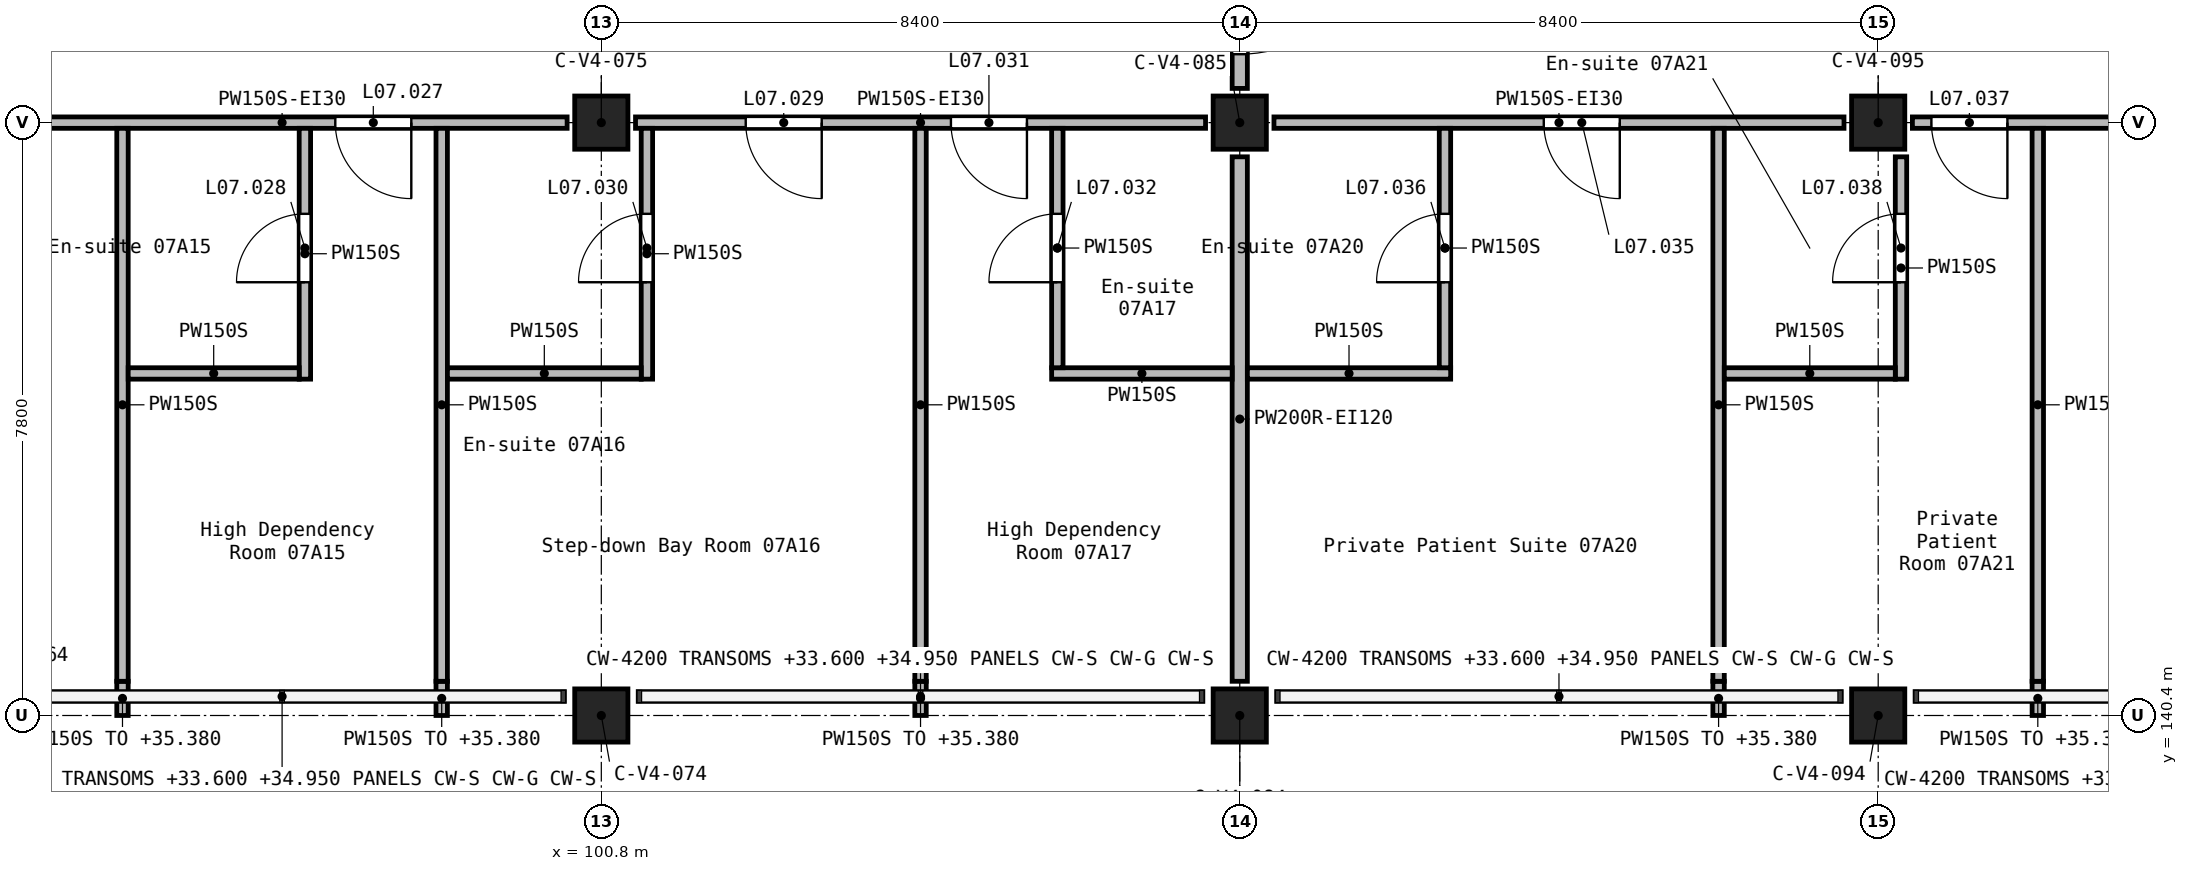
"""IFC4 building model, lengths in metres.
Left out: names, types, materials, properties, quantities, classifications, styles, units other than length and angle.
Written with IfcOpenShell. Run it as: python <this file> out.ifc"""

import sys

from ifc_helpers import new_model, si_unit, direction, frame, frame_2d, origin, origin_2d, place, context, subcontext, project, spatial, rectangle, extrude, element, fill, save


model = new_model("IFC4")
c1 = context("Model", 3, precision=1e-05, world=origin(), true_north=direction((0.0, 1.0)))
c2 = subcontext(c1, "Body", "Model", "MODEL_VIEW")
j1 = project(units=[si_unit("LENGTHUNIT", "METRE"), si_unit("PLANEANGLEUNIT", "RADIAN")], contexts=[c1])
p1 = place(None, origin())
s1 = spatial("IfcSite", under=j1, at=p1, CompositionType="ELEMENT")
p2 = place(p1, origin())
s2 = spatial("IfcBuilding", under=s1, at=p2, CompositionType="ELEMENT")
p3 = place(p2, frame((0.0, 0.0, 32.7)))
s3 = spatial("IfcBuildingStorey", under=s2, at=p3, CompositionType="ELEMENT", Elevation=32.7)
for number, where, z_axis, x_axis in (
    (1, (100.8, 140.4, 0.0), (0.0, 0.0, 1.0), (1.0, 0.0, 0.0)),
    (2, (100.8, 148.2, 0.0), (0.0, 0.0, 1.0), (1.0, 0.0, 0.0)),
    (3, (109.2, 140.4, 0.0), (0.0, 0.0, 1.0), (1.0, 0.0, 0.0)),
    (4, (109.2, 148.2, 0.0), (0.0, 0.0, 1.0), (1.0, 0.0, 0.0)),
    (5, (117.6, 140.4, 0.0), (0.0, 0.0, 1.0), (1.0, 0.0, 0.0)),
    (6, (117.6, 148.2, 0.0), (0.0, 0.0, 1.0), (1.0, 0.0, 0.0)),
):
    element("IfcColumn", number, at=place(p3, frame(where, z_axis=z_axis, x_axis=x_axis)), inside=s3, PredefinedType="COLUMN", context=c2, shape_type="SweptSolid", body=[
        extrude(rectangle(XDim=0.7, YDim=0.7, at=origin_2d()), origin(), (0.0, 0.0, 1.0), 3.9),
    ])
p4 = place(p3, frame((109.2, 151.35, 0.0), z_axis=(0.0, 0.0, 1.0), x_axis=(0.0, -1.0, 0.0)))
e7 = element("IfcWall", 7, at=p4, inside=s3, PredefinedType="SOLIDWALL", context=c2, shape_type="SweptSolid", body=[
    extrude(rectangle(XDim=2.7, YDim=0.2, at=frame_2d((1.35, 0.0))), origin(), (0.0, 0.0, 1.0), 3.6),
])
p5 = place(p4, frame((0.45, 0.0, 0.0)))
e8 = element("IfcOpeningElement", 8, at=p5, cuts=e7, PredefinedType="OPENING", context=c2, shape_type="SweptSolid", body=[
    extrude(rectangle(XDim=1.8, YDim=2.1, at=frame_2d((0.9, 1.05))), frame((0.0, 0.11, 0.0), z_axis=(0.0, -1.0, 0.0), x_axis=(1.0, 0.0, 0.0)), (0.0, 0.0, 1.0), 0.22),
])
p6 = place(p3, frame((109.2, 147.75, 0.0), z_axis=(0.0, 0.0, 1.0), x_axis=(0.0, -1.0, 0.0)))
e9 = element("IfcWall", 9, at=p6, inside=s3, PredefinedType="SOLIDWALL", context=c2, shape_type="SweptSolid", body=[
    extrude(rectangle(XDim=6.9, YDim=0.2, at=frame_2d((3.45, 0.0))), origin(), (0.0, 0.0, 1.0), 3.6),
])
p7 = place(p3, frame((125.55, 148.2, 0.0), z_axis=(0.0, 0.0, 1.0), x_axis=(-1.0, 0.0, 0.0)))
e10 = element("IfcWall", 10, at=p7, inside=s3, PredefinedType="PARTITIONING", context=c2, shape_type="SweptSolid", body=[
    extrude(rectangle(XDim=7.5, YDim=0.15, at=frame_2d((3.75, 0.0))), origin(), (0.0, 0.0, 1.0), 3.6),
])
p8 = place(p7, frame((6.25, 0.0, 0.0)))
e11 = element("IfcOpeningElement", 11, at=p8, cuts=e10, PredefinedType="OPENING", context=c2, shape_type="SweptSolid", body=[
    extrude(rectangle(XDim=1.0, YDim=2.1, at=frame_2d((0.5, 1.05))), frame((0.0, 0.085, 0.0), z_axis=(0.0, -1.0, 0.0), x_axis=(1.0, 0.0, 0.0)), (0.0, 0.0, 1.0), 0.17),
])
p9 = place(p7, frame((1.8, 0.0, 0.0)))
e12 = element("IfcOpeningElement", 12, at=p9, cuts=e10, PredefinedType="OPENING", context=c2, shape_type="SweptSolid", body=[
    extrude(rectangle(XDim=1.8, YDim=2.1, at=frame_2d((0.9, 1.05))), frame((0.0, 0.085, 0.0), z_axis=(0.0, -1.0, 0.0), x_axis=(1.0, 0.0, 0.0)), (0.0, 0.0, 1.0), 0.17),
])
p10 = place(p3, frame((117.15, 148.2, 0.0), z_axis=(0.0, 0.0, 1.0), x_axis=(-1.0, 0.0, 0.0)))
e13 = element("IfcWall", 13, at=p10, inside=s3, PredefinedType="PARTITIONING", context=c2, shape_type="SweptSolid", body=[
    extrude(rectangle(XDim=7.5, YDim=0.15, at=frame_2d((3.75, 0.0))), origin(), (0.0, 0.0, 1.0), 3.6),
])
p11 = place(p10, frame((2.95, 0.0, 0.0)))
e14 = element("IfcOpeningElement", 14, at=p11, cuts=e13, PredefinedType="OPENING", context=c2, shape_type="SweptSolid", body=[
    extrude(rectangle(XDim=1.0, YDim=2.1, at=frame_2d((0.5, 1.05))), frame((0.0, 0.085, 0.0), z_axis=(0.0, -1.0, 0.0), x_axis=(1.0, 0.0, 0.0)), (0.0, 0.0, 1.0), 0.17),
])
p12 = place(p3, frame((108.75, 148.2, 0.0), z_axis=(0.0, 0.0, 1.0), x_axis=(-1.0, 0.0, 0.0)))
e15 = element("IfcWall", 15, at=p12, inside=s3, PredefinedType="PARTITIONING", context=c2, shape_type="SweptSolid", body=[
    extrude(rectangle(XDim=7.5, YDim=0.15, at=frame_2d((3.75, 0.0))), origin(), (0.0, 0.0, 1.0), 3.6),
])
p13 = place(p12, frame((5.05, 0.0, 0.0)))
e16 = element("IfcOpeningElement", 16, at=p13, cuts=e15, PredefinedType="OPENING", context=c2, shape_type="SweptSolid", body=[
    extrude(rectangle(XDim=1.0, YDim=2.1, at=frame_2d((0.5, 1.05))), frame((0.0, 0.085, 0.0), z_axis=(0.0, -1.0, 0.0), x_axis=(1.0, 0.0, 0.0)), (0.0, 0.0, 1.0), 0.17),
])
p14 = place(p12, frame((2.35, 0.0, 0.0)))
e17 = element("IfcOpeningElement", 17, at=p14, cuts=e15, PredefinedType="OPENING", context=c2, shape_type="SweptSolid", body=[
    extrude(rectangle(XDim=1.0, YDim=2.1, at=frame_2d((0.5, 1.05))), frame((0.0, 0.085, 0.0), z_axis=(0.0, -1.0, 0.0), x_axis=(1.0, 0.0, 0.0)), (0.0, 0.0, 1.0), 0.17),
])
p15 = place(p3, frame((100.35, 148.2, 0.0), z_axis=(0.0, 0.0, 1.0), x_axis=(-1.0, 0.0, 0.0)))
e18 = element("IfcWall", 18, at=p15, inside=s3, PredefinedType="PARTITIONING", context=c2, shape_type="SweptSolid", body=[
    extrude(rectangle(XDim=7.5, YDim=0.15, at=frame_2d((3.75, 0.0))), origin(), (0.0, 0.0, 1.0), 3.6),
])
p16 = place(p15, frame((2.05, 0.0, 0.0)))
e19 = element("IfcOpeningElement", 19, at=p16, cuts=e18, PredefinedType="OPENING", context=c2, shape_type="SweptSolid", body=[
    extrude(rectangle(XDim=1.0, YDim=2.1, at=frame_2d((0.5, 1.05))), frame((0.0, 0.085, 0.0), z_axis=(0.0, -1.0, 0.0), x_axis=(1.0, 0.0, 0.0)), (0.0, 0.0, 1.0), 0.17),
])
p17 = place(p3, frame((94.5, 140.4, 0.0), z_axis=(0.0, 0.0, 1.0), x_axis=(0.0, 1.0, 0.0)))
e20 = element("IfcWall", 20, at=p17, inside=s3, PredefinedType="PARTITIONING", context=c2, shape_type="SweptSolid", body=[
    extrude(rectangle(XDim=0.45, YDim=0.15, at=frame_2d((0.225, 0.0))), origin(), (0.0, 0.0, 1.0), 2.68),
])
p18 = place(p3, frame((94.5, 140.85, 0.0), z_axis=(0.0, 0.0, 1.0), x_axis=(0.0, 1.0, 0.0)))
e21 = element("IfcWall", 21, at=p18, inside=s3, PredefinedType="PARTITIONING", context=c2, shape_type="SweptSolid", body=[
    extrude(rectangle(XDim=7.275, YDim=0.15, at=frame_2d((3.637, 0.0))), origin(), (0.0, 0.0, 1.0), 3.6),
])
p19 = place(p3, frame((98.7, 140.4, 0.0), z_axis=(0.0, 0.0, 1.0), x_axis=(0.0, 1.0, 0.0)))
e22 = element("IfcWall", 22, at=p19, inside=s3, PredefinedType="PARTITIONING", context=c2, shape_type="SweptSolid", body=[
    extrude(rectangle(XDim=0.45, YDim=0.15, at=frame_2d((0.225, 0.0))), origin(), (0.0, 0.0, 1.0), 2.68),
])
p20 = place(p3, frame((98.7, 140.85, 0.0), z_axis=(0.0, 0.0, 1.0), x_axis=(0.0, 1.0, 0.0)))
e23 = element("IfcWall", 23, at=p20, inside=s3, PredefinedType="PARTITIONING", context=c2, shape_type="SweptSolid", body=[
    extrude(rectangle(XDim=7.275, YDim=0.15, at=frame_2d((3.637, 0.0))), origin(), (0.0, 0.0, 1.0), 3.6),
])
p21 = place(p3, frame((105.0, 140.4, 0.0), z_axis=(0.0, 0.0, 1.0), x_axis=(0.0, 1.0, 0.0)))
e24 = element("IfcWall", 24, at=p21, inside=s3, PredefinedType="PARTITIONING", context=c2, shape_type="SweptSolid", body=[
    extrude(rectangle(XDim=0.45, YDim=0.15, at=frame_2d((0.225, 0.0))), origin(), (0.0, 0.0, 1.0), 2.68),
])
p22 = place(p3, frame((105.0, 140.85, 0.0), z_axis=(0.0, 0.0, 1.0), x_axis=(0.0, 1.0, 0.0)))
e25 = element("IfcWall", 25, at=p22, inside=s3, PredefinedType="PARTITIONING", context=c2, shape_type="SweptSolid", body=[
    extrude(rectangle(XDim=7.275, YDim=0.15, at=frame_2d((3.637, 0.0))), origin(), (0.0, 0.0, 1.0), 3.6),
])
p23 = place(p3, frame((115.5, 140.4, 0.0), z_axis=(0.0, 0.0, 1.0), x_axis=(0.0, 1.0, 0.0)))
e26 = element("IfcWall", 26, at=p23, inside=s3, PredefinedType="PARTITIONING", context=c2, shape_type="SweptSolid", body=[
    extrude(rectangle(XDim=0.45, YDim=0.15, at=frame_2d((0.225, 0.0))), origin(), (0.0, 0.0, 1.0), 2.68),
])
p24 = place(p3, frame((115.5, 140.85, 0.0), z_axis=(0.0, 0.0, 1.0), x_axis=(0.0, 1.0, 0.0)))
e27 = element("IfcWall", 27, at=p24, inside=s3, PredefinedType="PARTITIONING", context=c2, shape_type="SweptSolid", body=[
    extrude(rectangle(XDim=7.275, YDim=0.15, at=frame_2d((3.637, 0.0))), origin(), (0.0, 0.0, 1.0), 3.6),
])
p25 = place(p3, frame((119.7, 140.4, 0.0), z_axis=(0.0, 0.0, 1.0), x_axis=(0.0, 1.0, 0.0)))
e28 = element("IfcWall", 28, at=p25, inside=s3, PredefinedType="PARTITIONING", context=c2, shape_type="SweptSolid", body=[
    extrude(rectangle(XDim=0.45, YDim=0.15, at=frame_2d((0.225, 0.0))), origin(), (0.0, 0.0, 1.0), 2.68),
])
p26 = place(p3, frame((119.7, 140.85, 0.0), z_axis=(0.0, 0.0, 1.0), x_axis=(0.0, 1.0, 0.0)))
e29 = element("IfcWall", 29, at=p26, inside=s3, PredefinedType="PARTITIONING", context=c2, shape_type="SweptSolid", body=[
    extrude(rectangle(XDim=7.275, YDim=0.15, at=frame_2d((3.637, 0.0))), origin(), (0.0, 0.0, 1.0), 3.6),
])
p27 = place(p3, frame((106.725, 144.9, 0.0), z_axis=(0.0, 0.0, 1.0), x_axis=(1.0, 0.0, 0.0)))
e30 = element("IfcWall", 30, at=p27, inside=s3, PredefinedType="PARTITIONING", context=c2, shape_type="SweptSolid", body=[
    extrude(rectangle(XDim=2.375, YDim=0.15, at=frame_2d((1.188, 0.0))), origin(), (0.0, 0.0, 1.0), 3.6),
])
p28 = place(p3, frame((109.3, 144.9, 0.0), z_axis=(0.0, 0.0, 1.0), x_axis=(1.0, 0.0, 0.0)))
e31 = element("IfcWall", 31, at=p28, inside=s3, PredefinedType="PARTITIONING", context=c2, shape_type="SweptSolid", body=[
    extrude(rectangle(XDim=2.675, YDim=0.15, at=frame_2d((1.337, 0.0))), origin(), (0.0, 0.0, 1.0), 3.6),
])
p29 = place(p3, frame((96.9, 144.825, 0.0), z_axis=(0.0, 0.0, 1.0), x_axis=(0.0, 1.0, 0.0)))
e32 = element("IfcWall", 32, at=p29, inside=s3, PredefinedType="PARTITIONING", context=c2, shape_type="SweptSolid", body=[
    extrude(rectangle(XDim=3.3, YDim=0.15, at=frame_2d((1.65, 0.0))), origin(), (0.0, 0.0, 1.0), 3.6),
])
p30 = place(p29, frame((1.275, 0.0, 0.0)))
e33 = element("IfcOpeningElement", 33, at=p30, cuts=e32, PredefinedType="OPENING", context=c2, shape_type="SweptSolid", body=[
    extrude(rectangle(XDim=0.9, YDim=2.1, at=frame_2d((0.45, 1.05))), frame((0.0, 0.085, 0.0), z_axis=(0.0, -1.0, 0.0), x_axis=(1.0, 0.0, 0.0)), (0.0, 0.0, 1.0), 0.17),
])
p31 = place(p3, frame((101.4, 144.825, 0.0), z_axis=(0.0, 0.0, 1.0), x_axis=(0.0, 1.0, 0.0)))
e34 = element("IfcWall", 34, at=p31, inside=s3, PredefinedType="PARTITIONING", context=c2, shape_type="SweptSolid", body=[
    extrude(rectangle(XDim=3.3, YDim=0.15, at=frame_2d((1.65, 0.0))), origin(), (0.0, 0.0, 1.0), 3.6),
])
p32 = place(p31, frame((1.275, 0.0, 0.0)))
e35 = element("IfcOpeningElement", 35, at=p32, cuts=e34, PredefinedType="OPENING", context=c2, shape_type="SweptSolid", body=[
    extrude(rectangle(XDim=0.9, YDim=2.1, at=frame_2d((0.45, 1.05))), frame((0.0, 0.085, 0.0), z_axis=(0.0, -1.0, 0.0), x_axis=(1.0, 0.0, 0.0)), (0.0, 0.0, 1.0), 0.17),
])
p33 = place(p3, frame((106.8, 144.975, 0.0), z_axis=(0.0, 0.0, 1.0), x_axis=(0.0, 1.0, 0.0)))
e36 = element("IfcWall", 36, at=p33, inside=s3, PredefinedType="PARTITIONING", context=c2, shape_type="SweptSolid", body=[
    extrude(rectangle(XDim=3.15, YDim=0.15, at=frame_2d((1.575, 0.0))), origin(), (0.0, 0.0, 1.0), 3.6),
])
p34 = place(p33, frame((1.125, 0.0, 0.0)))
e37 = element("IfcOpeningElement", 37, at=p34, cuts=e36, PredefinedType="OPENING", context=c2, shape_type="SweptSolid", body=[
    extrude(rectangle(XDim=0.9, YDim=2.1, at=frame_2d((0.45, 1.05))), frame((0.0, 0.085, 0.0), z_axis=(0.0, -1.0, 0.0), x_axis=(1.0, 0.0, 0.0)), (0.0, 0.0, 1.0), 0.17),
])
p35 = place(p3, frame((111.9, 144.975, 0.0), z_axis=(0.0, 0.0, 1.0), x_axis=(0.0, 1.0, 0.0)))
e38 = element("IfcWall", 38, at=p35, inside=s3, PredefinedType="PARTITIONING", context=c2, shape_type="SweptSolid", body=[
    extrude(rectangle(XDim=3.15, YDim=0.15, at=frame_2d((1.575, 0.0))), origin(), (0.0, 0.0, 1.0), 3.6),
])
p36 = place(p35, frame((1.125, 0.0, 0.0)))
e39 = element("IfcOpeningElement", 39, at=p36, cuts=e38, PredefinedType="OPENING", context=c2, shape_type="SweptSolid", body=[
    extrude(rectangle(XDim=0.9, YDim=2.1, at=frame_2d((0.45, 1.05))), frame((0.0, 0.085, 0.0), z_axis=(0.0, -1.0, 0.0), x_axis=(1.0, 0.0, 0.0)), (0.0, 0.0, 1.0), 0.17),
])
p37 = place(p3, frame((117.9, 144.825, 0.0), z_axis=(0.0, 0.0, 1.0), x_axis=(0.0, 1.0, 0.0)))
e40 = element("IfcWall", 40, at=p37, inside=s3, PredefinedType="PARTITIONING", context=c2, shape_type="SweptSolid", body=[
    extrude(rectangle(XDim=2.925, YDim=0.15, at=frame_2d((1.462, 0.0))), origin(), (0.0, 0.0, 1.0), 3.6),
])
p38 = place(p37, frame((1.275, 0.0, 0.0)))
e41 = element("IfcOpeningElement", 41, at=p38, cuts=e40, PredefinedType="OPENING", context=c2, shape_type="SweptSolid", body=[
    extrude(rectangle(XDim=0.9, YDim=2.1, at=frame_2d((0.45, 1.05))), frame((0.0, 0.085, 0.0), z_axis=(0.0, -1.0, 0.0), x_axis=(1.0, 0.0, 0.0)), (0.0, 0.0, 1.0), 0.17),
])
p39 = place(p3, frame((98.775, 144.9, 0.0), z_axis=(0.0, 0.0, 1.0), x_axis=(1.0, 0.0, 0.0)))
e42 = element("IfcWall", 42, at=p39, inside=s3, PredefinedType="PARTITIONING", context=c2, shape_type="SweptSolid", body=[
    extrude(rectangle(XDim=2.55, YDim=0.15, at=frame_2d((1.275, 0.0))), origin(), (0.0, 0.0, 1.0), 3.6),
])
for number, where, z_axis, x_axis in (
    (43, (94.575, 144.9, 0.0), (0.0, 0.0, 1.0), (1.0, 0.0, 0.0)),
    (44, (115.575, 144.9, 0.0), (0.0, 0.0, 1.0), (1.0, 0.0, 0.0)),
):
    element("IfcWall", number, at=place(p3, frame(where, z_axis=z_axis, x_axis=x_axis)), inside=s3, PredefinedType="PARTITIONING", context=c2, shape_type="SweptSolid", body=[
        extrude(rectangle(XDim=2.25, YDim=0.15, at=frame_2d((1.125, 0.0))), origin(), (0.0, 0.0, 1.0), 3.6),
    ])
p40 = place(p5, origin())
e45 = element("IfcDoor", 45, at=p40, inside=s3, OperationType="DOUBLE_DOOR_SINGLE_SWING", PredefinedType="DOOR", context=c2, shape_type="SweptSolid", body=[
    extrude(rectangle(XDim=1.8, YDim=2.1, at=frame_2d((0.9, 1.05))), frame((0.0, 0.025, 0.0), z_axis=(0.0, -1.0, 0.0), x_axis=(1.0, 0.0, 0.0)), (0.0, 0.0, 1.0), 0.05),
])
fill(e8, e45)
p41 = place(p16, origin())
e46 = element("IfcDoor", 46, at=p41, inside=s3, OperationType="SINGLE_SWING_LEFT", PredefinedType="DOOR", context=c2, shape_type="SweptSolid", body=[
    extrude(rectangle(XDim=1.0, YDim=2.1, at=frame_2d((0.5, 1.05))), frame((0.0, 0.025, 0.0), z_axis=(0.0, -1.0, 0.0), x_axis=(1.0, 0.0, 0.0)), (0.0, 0.0, 1.0), 0.05),
])
fill(e19, e46)
p42 = place(p30, origin())
e47 = element("IfcDoor", 47, at=p42, inside=s3, OperationType="SINGLE_SWING_RIGHT", PredefinedType="DOOR", context=c2, shape_type="SweptSolid", body=[
    extrude(rectangle(XDim=0.9, YDim=2.1, at=frame_2d((0.45, 1.05))), frame((0.0, 0.025, 0.0), z_axis=(0.0, -1.0, 0.0), x_axis=(1.0, 0.0, 0.0)), (0.0, 0.0, 1.0), 0.05),
])
fill(e33, e47)
p43 = place(p13, origin())
e48 = element("IfcDoor", 48, at=p43, inside=s3, OperationType="SINGLE_SWING_RIGHT", PredefinedType="DOOR", context=c2, shape_type="SweptSolid", body=[
    extrude(rectangle(XDim=1.0, YDim=2.1, at=frame_2d((0.5, 1.05))), frame((0.0, 0.025, 0.0), z_axis=(0.0, -1.0, 0.0), x_axis=(1.0, 0.0, 0.0)), (0.0, 0.0, 1.0), 0.05),
])
fill(e16, e48)
p44 = place(p32, origin())
e49 = element("IfcDoor", 49, at=p44, inside=s3, OperationType="SINGLE_SWING_RIGHT", PredefinedType="DOOR", context=c2, shape_type="SweptSolid", body=[
    extrude(rectangle(XDim=0.9, YDim=2.1, at=frame_2d((0.45, 1.05))), frame((0.0, 0.025, 0.0), z_axis=(0.0, -1.0, 0.0), x_axis=(1.0, 0.0, 0.0)), (0.0, 0.0, 1.0), 0.05),
])
fill(e35, e49)
p45 = place(p14, origin())
e50 = element("IfcDoor", 50, at=p45, inside=s3, OperationType="SINGLE_SWING_LEFT", PredefinedType="DOOR", context=c2, shape_type="SweptSolid", body=[
    extrude(rectangle(XDim=1.0, YDim=2.1, at=frame_2d((0.5, 1.05))), frame((0.0, 0.025, 0.0), z_axis=(0.0, -1.0, 0.0), x_axis=(1.0, 0.0, 0.0)), (0.0, 0.0, 1.0), 0.05),
])
fill(e17, e50)
p46 = place(p34, frame((0.9, 0.0, 0.0), z_axis=(0.0, 0.0, 1.0), x_axis=(-1.0, 0.0, 0.0)))
e51 = element("IfcDoor", 51, at=p46, inside=s3, OperationType="SINGLE_SWING_LEFT", PredefinedType="DOOR", context=c2, shape_type="SweptSolid", body=[
    extrude(rectangle(XDim=0.9, YDim=2.1, at=frame_2d((0.45, 1.05))), frame((0.0, 0.025, 0.0), z_axis=(0.0, -1.0, 0.0), x_axis=(1.0, 0.0, 0.0)), (0.0, 0.0, 1.0), 0.05),
])
fill(e37, e51)
p47 = place(p11, origin())
e52 = element("IfcDoor", 52, at=p47, inside=s3, OperationType="SINGLE_SWING_LEFT", PredefinedType="DOOR", context=c2, shape_type="SweptSolid", body=[
    extrude(rectangle(XDim=1.0, YDim=2.1, at=frame_2d((0.5, 1.05))), frame((0.0, 0.025, 0.0), z_axis=(0.0, -1.0, 0.0), x_axis=(1.0, 0.0, 0.0)), (0.0, 0.0, 1.0), 0.05),
])
fill(e14, e52)
p48 = place(p36, origin())
e53 = element("IfcDoor", 53, at=p48, inside=s3, OperationType="SINGLE_SWING_RIGHT", PredefinedType="DOOR", context=c2, shape_type="SweptSolid", body=[
    extrude(rectangle(XDim=0.9, YDim=2.1, at=frame_2d((0.45, 1.05))), frame((0.0, 0.025, 0.0), z_axis=(0.0, -1.0, 0.0), x_axis=(1.0, 0.0, 0.0)), (0.0, 0.0, 1.0), 0.05),
])
fill(e39, e53)
p49 = place(p8, origin())
e54 = element("IfcDoor", 54, at=p49, inside=s3, OperationType="SINGLE_SWING_RIGHT", PredefinedType="DOOR", context=c2, shape_type="SweptSolid", body=[
    extrude(rectangle(XDim=1.0, YDim=2.1, at=frame_2d((0.5, 1.05))), frame((0.0, 0.025, 0.0), z_axis=(0.0, -1.0, 0.0), x_axis=(1.0, 0.0, 0.0)), (0.0, 0.0, 1.0), 0.05),
])
fill(e11, e54)
p50 = place(p38, origin())
e55 = element("IfcDoor", 55, at=p50, inside=s3, OperationType="SINGLE_SWING_RIGHT", PredefinedType="DOOR", context=c2, shape_type="SweptSolid", body=[
    extrude(rectangle(XDim=0.9, YDim=2.1, at=frame_2d((0.45, 1.05))), frame((0.0, 0.025, 0.0), z_axis=(0.0, -1.0, 0.0), x_axis=(1.0, 0.0, 0.0)), (0.0, 0.0, 1.0), 0.05),
])
fill(e41, e55)
save(model, sys.argv[1])
